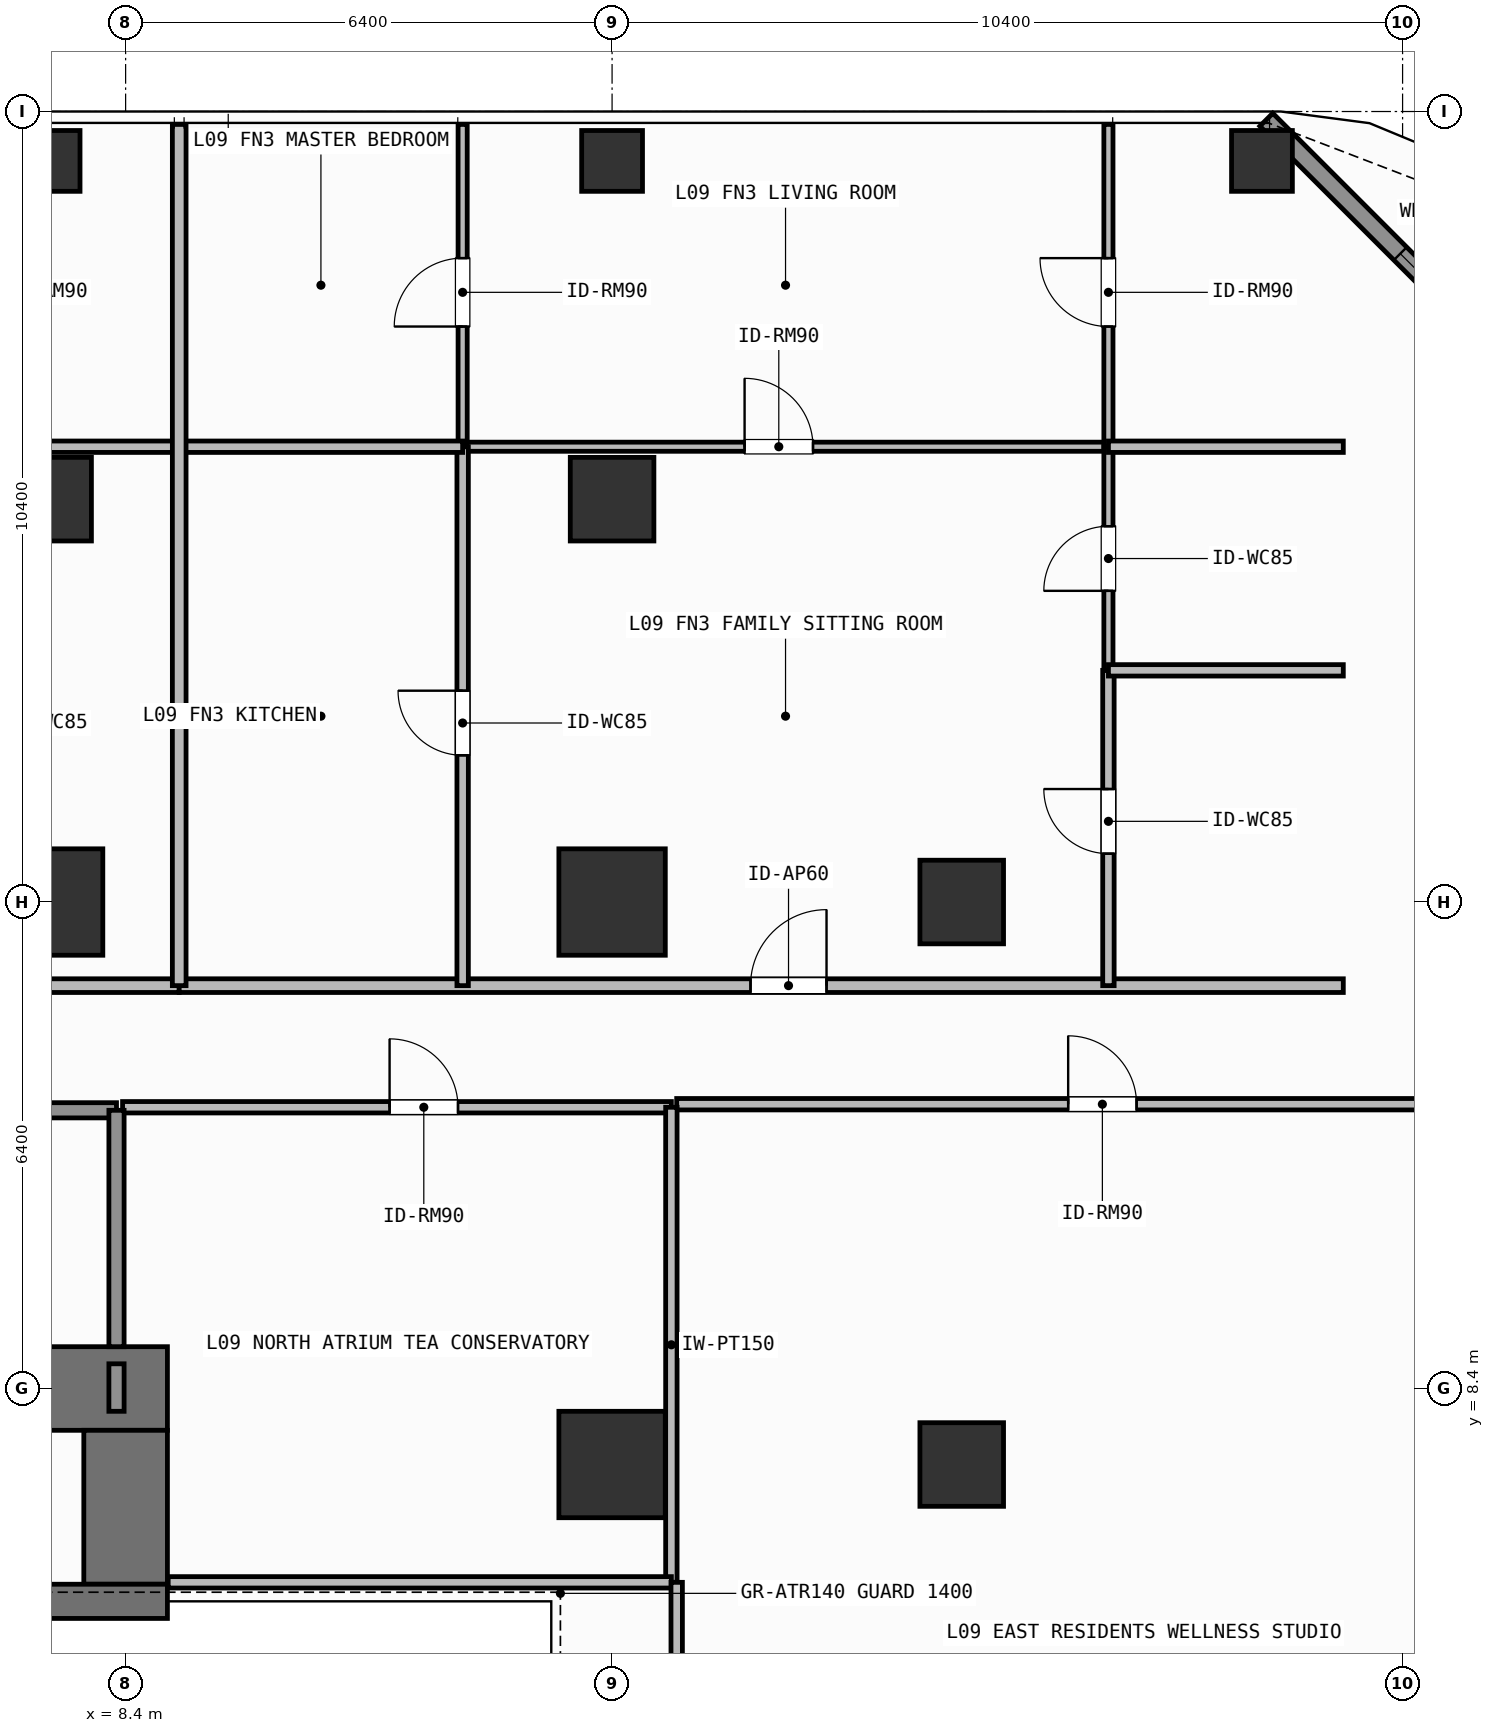
"""IFC4 building model, lengths in metres.
Left out: names, types, materials, properties, quantities, classifications, styles, units other than length and angle.
Written with IfcOpenShell. Run it as: python <this file> out.ifc"""

import sys

from ifc_helpers import new_model, si_unit, direction, frame, frame_2d, origin, origin_2d, place, context, subcontext, project, spatial, rectangle, hollow_rectangle, extrude, element, fill, save


model = new_model("IFC4")
c1 = context("Model", 3, precision=1e-05, world=origin(), true_north=direction((0.0, 1.0)))
c2 = subcontext(c1, "Body", "Model", "MODEL_VIEW")
j1 = project(units=[si_unit("LENGTHUNIT", "METRE"), si_unit("PLANEANGLEUNIT", "RADIAN")], contexts=[c1])
p1 = place(None, origin())
s1 = spatial("IfcSite", under=j1, at=p1, CompositionType="ELEMENT")
p2 = place(p1, origin())
s2 = spatial("IfcBuilding", under=s1, at=p2, CompositionType="ELEMENT")
p3 = place(p2, frame((0.0, 0.0, 34.5)))
s3 = spatial("IfcBuildingStorey", under=s2, at=p3, CompositionType="ELEMENT", Elevation=34.5)
p4 = place(p3, frame((-7.55, 8.4, 0.0), z_axis=(0.0, 0.0, 1.0), x_axis=(1.0, 0.0, 0.0)))
e1 = element("IfcWall", 1, at=p4, inside=s3, PredefinedType="SHEAR", context=c2, shape_type="SweptSolid", body=[
    extrude(rectangle(XDim=16.5, YDim=1.1, at=frame_2d((8.25, 0.0))), origin(), (0.0, 0.0, 1.0), 3.9),
])
p5 = place(p3, frame((8.4, 5.825, 0.0), z_axis=(0.0, 0.0, 1.0), x_axis=(0.0, 1.0, 0.0)))
e2 = element("IfcWall", 2, at=p5, inside=s3, PredefinedType="SHEAR", context=c2, shape_type="SweptSolid", body=[
    extrude(rectangle(XDim=2.025, YDim=1.1, at=frame_2d((1.013, 0.0))), origin(), (0.0, 0.0, 1.0), 3.9),
])
p6 = place(p3, frame((3.045, 5.6, 0.0), z_axis=(0.0, 0.0, 1.0), x_axis=(1.0, 0.0, 0.0)))
e3 = element("IfcWall", 3, at=p6, inside=s3, PredefinedType="SHEAR", context=c2, shape_type="SweptSolid", body=[
    extrude(rectangle(XDim=5.905, YDim=0.45, at=frame_2d((2.953, 0.0))), origin(), (0.0, 0.0, 1.0), 3.9),
])
for number, where, z_axis, x_axis in (
    (4, (7.4, 14.8, 0.0), (0.0, 0.0, 1.0), (1.0, 0.0, 0.0)),
    (5, (14.8, 14.8, 0.0), (0.0, 0.0, 1.0), (1.0, 0.0, 0.0)),
    (6, (14.8, 7.4, 0.0), (0.0, 0.0, 1.0), (1.0, 0.0, 0.0)),
):
    element("IfcColumn", number, at=place(p3, frame(where, z_axis=z_axis, x_axis=x_axis)), inside=s3, PredefinedType="COLUMN", context=c2, shape_type="SweptSolid", body=[
        extrude(rectangle(XDim=1.4, YDim=1.4, at=origin_2d()), origin(), (0.0, 0.0, 1.0), 3.9),
    ])
for number, where, z_axis, x_axis in (
    (7, (19.4, 7.4, 0.0), (0.0, 0.0, 1.0), (1.0, 0.0, 0.0)),
    (8, (19.4, 14.8, 0.0), (0.0, 0.0, 1.0), (1.0, 0.0, 0.0)),
    (9, (7.4, 20.1, 0.0), (0.0, 0.0, 1.0), (1.0, 0.0, 0.0)),
    (10, (14.8, 20.1, 0.0), (0.0, 0.0, 1.0), (1.0, 0.0, 0.0)),
):
    element("IfcColumn", number, at=place(p3, frame(where, z_axis=z_axis, x_axis=x_axis)), inside=s3, PredefinedType="COLUMN", context=c2, shape_type="SweptSolid", body=[
        extrude(rectangle(XDim=1.1, YDim=1.1, at=origin_2d()), origin(), (0.0, 0.0, 1.0), 3.9),
    ])
for number, where, z_axis, x_axis in (
    (11, (23.35, 24.55, 0.0), (0.0, 0.0, 1.0), (1.0, 0.0, 0.0)),
    (12, (7.4, 24.55, 0.0), (0.0, 0.0, 1.0), (1.0, 0.0, 0.0)),
    (13, (14.8, 24.55, 0.0), (0.0, 0.0, 1.0), (1.0, 0.0, 0.0)),
):
    element("IfcColumn", number, at=place(p3, frame(where, z_axis=z_axis, x_axis=x_axis)), inside=s3, PredefinedType="COLUMN", context=c2, shape_type="SweptSolid", body=[
        extrude(hollow_rectangle(XDim=0.8, YDim=0.8, WallThickness=0.036, at=origin_2d()), origin(), (0.0, 0.0, 1.0), 3.9),
    ])
p7 = place(p3, frame((23.408, 25.092, 0.0), z_axis=(0.0, 0.0, 1.0), x_axis=(0.707106781187, -0.707106781187, 0.0)))
e14 = element("IfcWall", 14, at=p7, inside=s3, PredefinedType="SOLIDWALL", context=c2, shape_type="SweptSolid", body=[
    extrude(rectangle(XDim=6.484, YDim=0.24, at=frame_2d((3.242, 0.0))), origin(), (0.0, 0.0, 1.0), 3.68),
])
p8 = place(p7, frame((2.492, 0.0, 0.8)))
e15 = element("IfcOpeningElement", 15, at=p8, cuts=e14, PredefinedType="OPENING", context=c2, shape_type="SweptSolid", body=[
    extrude(rectangle(XDim=1.5, YDim=1.85, at=frame_2d((0.75, 0.925))), frame((0.0, 0.13, 0.0), z_axis=(0.0, -1.0, 0.0), x_axis=(1.0, 0.0, 0.0)), (0.0, 0.0, 1.0), 0.26),
])
p9 = place(p3, frame((4.58, 12.06, 0.0), z_axis=(0.0, 0.0, 1.0), x_axis=(1.0, 0.0, 0.0)))
e16 = element("IfcWall", 16, at=p9, inside=s3, PredefinedType="SOLIDWALL", context=c2, shape_type="SweptSolid", body=[
    extrude(rectangle(XDim=3.7, YDim=0.2, at=frame_2d((1.85, 0.0))), origin(), (0.0, 0.0, 1.0), 3.68),
])
p10 = place(p9, frame((1.212, 0.0, 0.0)))
e17 = element("IfcOpeningElement", 17, at=p10, cuts=e16, PredefinedType="OPENING", context=c2, shape_type="SweptSolid", body=[
    extrude(rectangle(XDim=1.1, YDim=2.15, at=frame_2d((0.55, 1.075))), frame((0.0, 0.11, 0.0), z_axis=(0.0, -1.0, 0.0), x_axis=(1.0, 0.0, 0.0)), (0.0, 0.0, 1.0), 0.22),
])
p11 = place(p3, frame((8.36, 12.1, 0.0), z_axis=(0.0, 0.0, 1.0), x_axis=(1.0, 0.0, 0.0)))
e18 = element("IfcWall", 18, at=p11, inside=s3, PredefinedType="PARTITIONING", context=c2, shape_type="SweptSolid", body=[
    extrude(rectangle(XDim=7.22, YDim=0.15, at=frame_2d((3.61, 0.0))), origin(), (0.0, 0.0, 1.0), 3.68),
])
p12 = place(p11, frame((3.513, 0.0, 0.0)))
e19 = element("IfcOpeningElement", 19, at=p12, cuts=e18, PredefinedType="OPENING", context=c2, shape_type="SweptSolid", body=[
    extrude(rectangle(XDim=0.9, YDim=2.1, at=frame_2d((0.45, 1.05))), frame((0.0, 0.085, 0.0), z_axis=(0.0, -1.0, 0.0), x_axis=(1.0, 0.0, 0.0)), (0.0, 0.0, 1.0), 0.17),
])
p13 = place(p3, frame((-2.121, 13.7, 0.0), z_axis=(0.0, 0.0, 1.0), x_axis=(1.0, 0.0, 0.0)))
e20 = element("IfcWall", 20, at=p13, inside=s3, PredefinedType="PARTITIONING", context=c2, shape_type="SweptSolid", body=[
    extrude(rectangle(XDim=11.226, YDim=0.18, at=frame_2d((5.613, 0.0))), origin(), (0.0, 0.0, 1.0), 3.68),
])
p14 = place(p13, frame((5.29, 0.0, 0.0)))
e21 = element("IfcOpeningElement", 21, at=p14, cuts=e20, PredefinedType="OPENING", context=c2, shape_type="SweptSolid", body=[
    extrude(rectangle(XDim=1.0, YDim=2.2, at=frame_2d((0.5, 1.1))), frame((0.0, 0.1, 0.0), z_axis=(0.0, -1.0, 0.0), x_axis=(1.0, 0.0, 0.0)), (0.0, 0.0, 1.0), 0.2),
])
p15 = place(p3, frame((9.105, 13.7, 0.0), z_axis=(0.0, 0.0, 1.0), x_axis=(1.0, 0.0, 0.0)))
e22 = element("IfcWall", 22, at=p15, inside=s3, PredefinedType="PARTITIONING", context=c2, shape_type="SweptSolid", body=[
    extrude(rectangle(XDim=15.315, YDim=0.18, at=frame_2d((7.657, 0.0))), origin(), (0.0, 0.0, 1.0), 3.68),
])
p16 = place(p15, frame((7.516, 0.0, 0.0)))
e23 = element("IfcOpeningElement", 23, at=p16, cuts=e22, PredefinedType="OPENING", context=c2, shape_type="SweptSolid", body=[
    extrude(rectangle(XDim=1.0, YDim=2.2, at=frame_2d((0.5, 1.1))), frame((0.0, 0.1, 0.0), z_axis=(0.0, -1.0, 0.0), x_axis=(1.0, 0.0, 0.0)), (0.0, 0.0, 1.0), 0.2),
])
p17 = place(p3, frame((12.834, 20.79, 0.0), z_axis=(0.0, 0.0, 1.0), x_axis=(1.0, 0.0, 0.0)))
e24 = element("IfcWall", 24, at=p17, inside=s3, PredefinedType="PARTITIONING", context=c2, shape_type="SweptSolid", body=[
    extrude(rectangle(XDim=8.496, YDim=0.12, at=frame_2d((4.248, 0.0))), origin(), (0.0, 0.0, 1.0), 3.68),
])
p18 = place(p17, frame((3.709, 0.0, 0.0)))
e25 = element("IfcOpeningElement", 25, at=p18, cuts=e24, PredefinedType="OPENING", context=c2, shape_type="SweptSolid", body=[
    extrude(rectangle(XDim=0.9, YDim=2.1, at=frame_2d((0.45, 1.05))), frame((0.0, 0.07, 0.0), z_axis=(0.0, -1.0, 0.0), x_axis=(1.0, 0.0, 0.0)), (0.0, 0.0, 1.0), 0.14),
])
p19 = place(p3, frame((12.834, 13.7, 0.0), z_axis=(0.0, 0.0, 1.0), x_axis=(0.0, 1.0, 0.0)))
e26 = element("IfcWall", 26, at=p19, inside=s3, PredefinedType="PARTITIONING", context=c2, shape_type="SweptSolid", body=[
    extrude(rectangle(XDim=7.09, YDim=0.15, at=frame_2d((3.545, 0.0))), origin(), (0.0, 0.0, 1.0), 3.68),
])
p20 = place(p19, frame((3.03, 0.0, 0.0)))
e27 = element("IfcOpeningElement", 27, at=p20, cuts=e26, PredefinedType="OPENING", context=c2, shape_type="SweptSolid", body=[
    extrude(rectangle(XDim=0.85, YDim=2.1, at=frame_2d((0.425, 1.05))), frame((0.0, 0.085, 0.0), z_axis=(0.0, -1.0, 0.0), x_axis=(1.0, 0.0, 0.0)), (0.0, 0.0, 1.0), 0.17),
])
p21 = place(p3, frame((12.834, 20.79, 0.0), z_axis=(0.0, 0.0, 1.0), x_axis=(0.0, 1.0, 0.0)))
e28 = element("IfcWall", 28, at=p21, inside=s3, PredefinedType="PARTITIONING", context=c2, shape_type="SweptSolid", body=[
    extrude(rectangle(XDim=4.24, YDim=0.12, at=frame_2d((2.12, 0.0))), origin(), (0.0, 0.0, 1.0), 3.68),
])
p22 = place(p21, frame((1.581, 0.0, 0.0)))
e29 = element("IfcOpeningElement", 29, at=p22, cuts=e28, PredefinedType="OPENING", context=c2, shape_type="SweptSolid", body=[
    extrude(rectangle(XDim=0.9, YDim=2.1, at=frame_2d((0.45, 1.05))), frame((0.0, 0.07, 0.0), z_axis=(0.0, -1.0, 0.0), x_axis=(1.0, 0.0, 0.0)), (0.0, 0.0, 1.0), 0.14),
])
p23 = place(p3, frame((21.33, 13.7, 0.0), z_axis=(0.0, 0.0, 1.0), x_axis=(0.0, 1.0, 0.0)))
e30 = element("IfcWall", 30, at=p23, inside=s3, PredefinedType="PARTITIONING", context=c2, shape_type="SweptSolid", body=[
    extrude(rectangle(XDim=4.148, YDim=0.15, at=frame_2d((2.074, 0.0))), origin(), (0.0, 0.0, 1.0), 3.68),
])
p24 = place(p23, frame((1.737, 0.0, 0.0)))
e31 = element("IfcOpeningElement", 31, at=p24, cuts=e30, PredefinedType="OPENING", context=c2, shape_type="SweptSolid", body=[
    extrude(rectangle(XDim=0.85, YDim=2.1, at=frame_2d((0.425, 1.05))), frame((0.0, 0.085, 0.0), z_axis=(0.0, -1.0, 0.0), x_axis=(1.0, 0.0, 0.0)), (0.0, 0.0, 1.0), 0.17),
])
p25 = place(p3, frame((21.33, 17.848, 0.0), z_axis=(0.0, 0.0, 1.0), x_axis=(0.0, 1.0, 0.0)))
e32 = element("IfcWall", 32, at=p25, inside=s3, PredefinedType="PARTITIONING", context=c2, shape_type="SweptSolid", body=[
    extrude(rectangle(XDim=2.942, YDim=0.12, at=frame_2d((1.471, 0.0))), origin(), (0.0, 0.0, 1.0), 3.68),
])
p26 = place(p25, frame((1.046, 0.0, 0.0)))
e33 = element("IfcOpeningElement", 33, at=p26, cuts=e32, PredefinedType="OPENING", context=c2, shape_type="SweptSolid", body=[
    extrude(rectangle(XDim=0.85, YDim=2.1, at=frame_2d((0.425, 1.05))), frame((0.0, 0.07, 0.0), z_axis=(0.0, -1.0, 0.0), x_axis=(1.0, 0.0, 0.0)), (0.0, 0.0, 1.0), 0.14),
])
p27 = place(p3, frame((21.33, 20.79, 0.0), z_axis=(0.0, 0.0, 1.0), x_axis=(0.0, 1.0, 0.0)))
e34 = element("IfcWall", 34, at=p27, inside=s3, PredefinedType="PARTITIONING", context=c2, shape_type="SweptSolid", body=[
    extrude(rectangle(XDim=4.24, YDim=0.12, at=frame_2d((2.12, 0.0))), origin(), (0.0, 0.0, 1.0), 3.68),
])
p28 = place(p27, frame((1.581, 0.0, 0.0)))
e35 = element("IfcOpeningElement", 35, at=p28, cuts=e34, PredefinedType="OPENING", context=c2, shape_type="SweptSolid", body=[
    extrude(rectangle(XDim=0.9, YDim=2.1, at=frame_2d((0.45, 1.05))), frame((0.0, 0.07, 0.0), z_axis=(0.0, -1.0, 0.0), x_axis=(1.0, 0.0, 0.0)), (0.0, 0.0, 1.0), 0.14),
])
p29 = place(p3, frame((15.65, 12.14, 0.0), z_axis=(0.0, 0.0, 1.0), x_axis=(1.0, 0.0, 0.0)))
e36 = element("IfcWall", 36, at=p29, inside=s3, PredefinedType="PARTITIONING", context=c2, shape_type="SweptSolid", body=[
    extrude(rectangle(XDim=12.27, YDim=0.15, at=frame_2d((6.135, 0.0))), origin(), (0.0, 0.0, 1.0), 3.68),
])
p30 = place(p29, frame((5.15, 0.0, 0.0)))
e37 = element("IfcOpeningElement", 37, at=p30, cuts=e36, PredefinedType="OPENING", context=c2, shape_type="SweptSolid", body=[
    extrude(rectangle(XDim=0.9, YDim=2.1, at=frame_2d((0.45, 1.05))), frame((0.0, 0.085, 0.0), z_axis=(0.0, -1.0, 0.0), x_axis=(1.0, 0.0, 0.0)), (0.0, 0.0, 1.0), 0.17),
])
p31 = place(p3, frame((8.28, 8.95, 0.0), z_axis=(0.0, 0.0, 1.0), x_axis=(0.0, 1.0, 0.0)))
e38 = element("IfcWall", 38, at=p31, inside=s3, PredefinedType="SOLIDWALL", context=c2, shape_type="SweptSolid", body=[
    extrude(rectangle(XDim=3.11, YDim=0.2, at=frame_2d((1.555, 0.0))), origin(), (0.0, 0.0, 1.0), 3.68),
])
p32 = place(p3, frame((8.28, 8.1, 0.0), z_axis=(0.0, 0.0, 1.0), x_axis=(0.0, 1.0, 0.0)))
e39 = element("IfcWall", 39, at=p32, inside=s3, PredefinedType="SOLIDWALL", context=c2, shape_type="SweptSolid", body=[
    extrude(rectangle(XDim=0.625, YDim=0.2, at=frame_2d((0.312, 0.0))), origin(), (0.0, 0.0, 1.0), 3.68),
])
p33 = place(p3, frame((15.58, 5.85, 0.0), z_axis=(0.0, 0.0, 1.0), x_axis=(0.0, 1.0, 0.0)))
e40 = element("IfcWall", 40, at=p33, inside=s3, PredefinedType="PARTITIONING", context=c2, shape_type="SweptSolid", body=[
    extrude(rectangle(XDim=6.25, YDim=0.15, at=frame_2d((3.125, 0.0))), origin(), (0.0, 0.0, 1.0), 3.68),
])
p34 = place(p3, frame((8.96, 5.85, 0.0), z_axis=(0.0, 0.0, 1.0), x_axis=(1.0, 0.0, 0.0)))
e41 = element("IfcWall", 41, at=p34, inside=s3, PredefinedType="PARTITIONING", context=c2, shape_type="SweptSolid", body=[
    extrude(rectangle(XDim=6.62, YDim=0.15, at=frame_2d((3.31, 0.0))), origin(), (0.0, 0.0, 1.0), 3.68),
])
p35 = place(p3, frame((5.466, 20.79, 0.0), z_axis=(0.0, 0.0, 1.0), x_axis=(1.0, 0.0, 0.0)))
e42 = element("IfcWall", 42, at=p35, inside=s3, PredefinedType="PARTITIONING", context=c2, shape_type="SweptSolid", body=[
    extrude(rectangle(XDim=3.639, YDim=0.15, at=frame_2d((1.819, 0.0))), origin(), (0.0, 0.0, 1.0), 3.68),
])
p36 = place(p3, frame((9.105, 20.79, 0.0), z_axis=(0.0, 0.0, 1.0), x_axis=(1.0, 0.0, 0.0)))
e43 = element("IfcWall", 43, at=p36, inside=s3, PredefinedType="PARTITIONING", context=c2, shape_type="SweptSolid", body=[
    extrude(rectangle(XDim=3.729, YDim=0.15, at=frame_2d((1.865, 0.0))), origin(), (0.0, 0.0, 1.0), 3.68),
])
for number, where, z_axis, x_axis in (
    (44, (21.33, 17.848, 0.0), (0.0, 0.0, 1.0), (1.0, 0.0, 0.0)),
    (45, (21.33, 20.79, 0.0), (0.0, 0.0, 1.0), (1.0, 0.0, 0.0)),
):
    element("IfcWall", number, at=place(p3, frame(where, z_axis=z_axis, x_axis=x_axis)), inside=s3, PredefinedType="PARTITIONING", context=c2, shape_type="SweptSolid", body=[
        extrude(rectangle(XDim=3.09, YDim=0.15, at=frame_2d((1.545, 0.0))), origin(), (0.0, 0.0, 1.0), 3.68),
    ])
p37 = place(p3, frame((9.105, 13.7, 0.0), z_axis=(0.0, 0.0, 1.0), x_axis=(0.0, 1.0, 0.0)))
e46 = element("IfcWall", 46, at=p37, inside=s3, PredefinedType="PARTITIONING", context=c2, shape_type="SweptSolid", body=[
    extrude(rectangle(XDim=11.33, YDim=0.18, at=frame_2d((5.665, 0.0))), origin(), (0.0, 0.0, 1.0), 3.68),
])
p38 = place(p3, frame((15.65, -1.8, 0.0), z_axis=(0.0, 0.0, 1.0), x_axis=(0.0, 1.0, 0.0)))
e47 = element("IfcWall", 47, at=p38, inside=s3, PredefinedType="PARTITIONING", context=c2, shape_type="SweptSolid", body=[
    extrude(rectangle(XDim=7.65, YDim=0.15, at=frame_2d((3.825, 0.0))), origin(), (0.0, 0.0, 1.0), 3.68),
])
p39 = place(p8, origin())
e48 = element("IfcWindow", 48, at=p39, inside=s3, PartitioningType="SINGLE_PANEL", PredefinedType="WINDOW", context=c2, shape_type="SweptSolid", body=[
    extrude(rectangle(XDim=1.5, YDim=1.85, at=frame_2d((0.75, 0.925))), frame((0.0, 0.03, 0.0), z_axis=(0.0, -1.0, 0.0), x_axis=(1.0, 0.0, 0.0)), (0.0, 0.0, 1.0), 0.06),
])
fill(e15, e48)
p40 = place(p12, origin())
e49 = element("IfcDoor", 49, at=p40, inside=s3, OperationType="SINGLE_SWING_LEFT", PredefinedType="DOOR", context=c2, shape_type="SweptSolid", body=[
    extrude(rectangle(XDim=0.9, YDim=2.1, at=frame_2d((0.45, 1.05))), frame((0.0, 0.025, 0.0), z_axis=(0.0, -1.0, 0.0), x_axis=(1.0, 0.0, 0.0)), (0.0, 0.0, 1.0), 0.05),
])
fill(e19, e49)
p41 = place(p16, origin())
e50 = element("IfcDoor", 50, at=p41, inside=s3, OperationType="SINGLE_SWING_RIGHT", PredefinedType="DOOR", context=c2, shape_type="SweptSolid", body=[
    extrude(rectangle(XDim=1.0, YDim=2.2, at=frame_2d((0.5, 1.1))), frame((0.0, 0.025, 0.0), z_axis=(0.0, -1.0, 0.0), x_axis=(1.0, 0.0, 0.0)), (0.0, 0.0, 1.0), 0.05),
])
fill(e23, e50)
p42 = place(p18, origin())
e51 = element("IfcDoor", 51, at=p42, inside=s3, OperationType="SINGLE_SWING_LEFT", PredefinedType="DOOR", context=c2, shape_type="SweptSolid", body=[
    extrude(rectangle(XDim=0.9, YDim=2.1, at=frame_2d((0.45, 1.05))), frame((0.0, 0.025, 0.0), z_axis=(0.0, -1.0, 0.0), x_axis=(1.0, 0.0, 0.0)), (0.0, 0.0, 1.0), 0.05),
])
fill(e25, e51)
p43 = place(p20, origin())
e52 = element("IfcDoor", 52, at=p43, inside=s3, OperationType="SINGLE_SWING_RIGHT", PredefinedType="DOOR", context=c2, shape_type="SweptSolid", body=[
    extrude(rectangle(XDim=0.85, YDim=2.1, at=frame_2d((0.425, 1.05))), frame((0.0, 0.025, 0.0), z_axis=(0.0, -1.0, 0.0), x_axis=(1.0, 0.0, 0.0)), (0.0, 0.0, 1.0), 0.05),
])
fill(e27, e52)
p44 = place(p22, origin())
e53 = element("IfcDoor", 53, at=p44, inside=s3, OperationType="SINGLE_SWING_LEFT", PredefinedType="DOOR", context=c2, shape_type="SweptSolid", body=[
    extrude(rectangle(XDim=0.9, YDim=2.1, at=frame_2d((0.45, 1.05))), frame((0.0, 0.025, 0.0), z_axis=(0.0, -1.0, 0.0), x_axis=(1.0, 0.0, 0.0)), (0.0, 0.0, 1.0), 0.05),
])
fill(e29, e53)
p45 = place(p24, origin())
e54 = element("IfcDoor", 54, at=p45, inside=s3, OperationType="SINGLE_SWING_RIGHT", PredefinedType="DOOR", context=c2, shape_type="SweptSolid", body=[
    extrude(rectangle(XDim=0.85, YDim=2.1, at=frame_2d((0.425, 1.05))), frame((0.0, 0.025, 0.0), z_axis=(0.0, -1.0, 0.0), x_axis=(1.0, 0.0, 0.0)), (0.0, 0.0, 1.0), 0.05),
])
fill(e31, e54)
p46 = place(p26, origin())
e55 = element("IfcDoor", 55, at=p46, inside=s3, OperationType="SINGLE_SWING_LEFT", PredefinedType="DOOR", context=c2, shape_type="SweptSolid", body=[
    extrude(rectangle(XDim=0.85, YDim=2.1, at=frame_2d((0.425, 1.05))), frame((0.0, 0.025, 0.0), z_axis=(0.0, -1.0, 0.0), x_axis=(1.0, 0.0, 0.0)), (0.0, 0.0, 1.0), 0.05),
])
fill(e33, e55)
p47 = place(p28, origin())
e56 = element("IfcDoor", 56, at=p47, inside=s3, OperationType="SINGLE_SWING_RIGHT", PredefinedType="DOOR", context=c2, shape_type="SweptSolid", body=[
    extrude(rectangle(XDim=0.9, YDim=2.1, at=frame_2d((0.45, 1.05))), frame((0.0, 0.025, 0.0), z_axis=(0.0, -1.0, 0.0), x_axis=(1.0, 0.0, 0.0)), (0.0, 0.0, 1.0), 0.05),
])
fill(e35, e56)
p48 = place(p30, origin())
e57 = element("IfcDoor", 57, at=p48, inside=s3, OperationType="SINGLE_SWING_LEFT", PredefinedType="DOOR", context=c2, shape_type="SweptSolid", body=[
    extrude(rectangle(XDim=0.9, YDim=2.1, at=frame_2d((0.45, 1.05))), frame((0.0, 0.025, 0.0), z_axis=(0.0, -1.0, 0.0), x_axis=(1.0, 0.0, 0.0)), (0.0, 0.0, 1.0), 0.05),
])
fill(e37, e57)
save(model, sys.argv[1])
